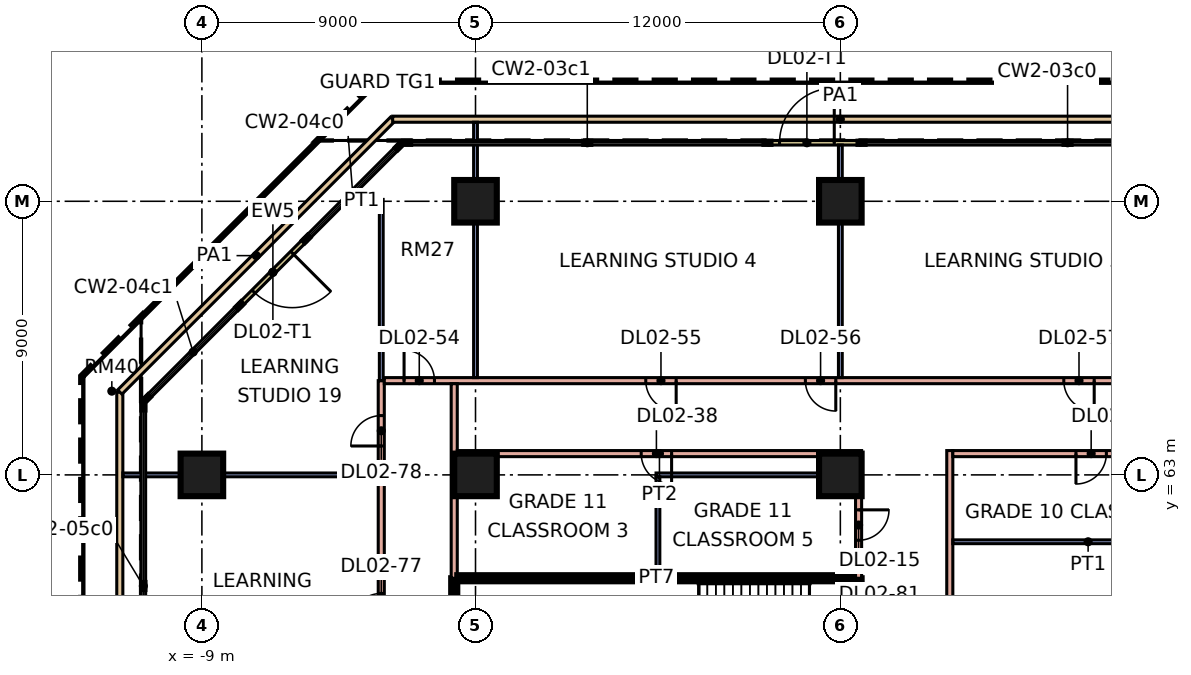
"""IFC4 building model, lengths in metres.
Left out: names, types, materials, properties, quantities, classifications, styles, units other than length and angle.
Written with IfcOpenShell. Run it as: python <this file> out.ifc"""

import sys

from ifc_helpers import new_model, si_unit, direction, frame, frame_2d, origin, origin_2d, place, context, subcontext, project, spatial, rectangle, extrude, element, fill, save


model = new_model("IFC4")
c1 = context("Model", 3, precision=1e-05, world=origin(), true_north=direction((0.0, 1.0)))
c2 = subcontext(c1, "Body", "Model", "MODEL_VIEW")
j1 = project(units=[si_unit("LENGTHUNIT", "METRE"), si_unit("PLANEANGLEUNIT", "RADIAN")], contexts=[c1])
p1 = place(None, origin())
s1 = spatial("IfcSite", under=j1, at=p1, CompositionType="ELEMENT")
p2 = place(p1, origin())
s2 = spatial("IfcBuilding", under=s1, at=p2, CompositionType="ELEMENT")
p3 = place(p2, frame((0.0, 0.0, 12.0)))
s3 = spatial("IfcBuildingStorey", under=s2, at=p3, CompositionType="ELEMENT", Elevation=12.0)
for number, where, z_axis, x_axis in (
    (1, (-9.0, 63.0, 0.0), (0.0, 0.0, 1.0), (1.0, 0.0, 0.0)),
    (2, (0.0, 63.0, 0.0), (0.0, 0.0, 1.0), (1.0, 0.0, 0.0)),
    (3, (12.0, 63.0, 0.0), (0.0, 0.0, 1.0), (1.0, 0.0, 0.0)),
    (4, (0.0, 72.0, 0.0), (0.0, 0.0, 1.0), (1.0, 0.0, 0.0)),
    (5, (12.0, 72.0, 0.0), (0.0, 0.0, 1.0), (1.0, 0.0, 0.0)),
):
    element("IfcColumn", number, at=place(p3, frame(where, z_axis=z_axis, x_axis=x_axis)), inside=s3, PredefinedType="COLUMN", context=c2, shape_type="SweptSolid", body=[
        extrude(rectangle(XDim=1.4, YDim=1.4, at=origin_2d()), origin(), (0.0, 0.0, 1.0), 4.8),
    ])
p4 = place(p3, frame((12.65, 73.925, 0.0), z_axis=(0.0, 0.0, 1.0), x_axis=(-1.0, 0.0, 0.0)))
e6 = element("IfcWall", 6, at=p4, inside=s3, PredefinedType="SOLIDWALL", context=c2, shape_type="SweptSolid", body=[
    extrude(rectangle(XDim=3.0, YDim=0.15, at=frame_2d((1.5, 0.0))), origin(), (0.0, 0.0, 1.0), 4.4),
])
p5 = place(p4, frame((0.85, 0.0, 0.0)))
e7 = element("IfcOpeningElement", 7, at=p5, cuts=e6, PredefinedType="OPENING", context=c2, shape_type="SweptSolid", body=[
    extrude(rectangle(XDim=1.8, YDim=2.4, at=frame_2d((0.9, 1.2))), frame((0.0, 0.085, 0.0), z_axis=(0.0, -1.0, 0.0), x_axis=(1.0, 0.0, 0.0)), (0.0, 0.0, 1.0), 0.17),
])
p6 = place(p3, frame((-5.604, 70.725, 0.0), z_axis=(0.0, 0.0, 1.0), x_axis=(-0.707106781187, -0.707106781187, 0.0)))
e8 = element("IfcWall", 8, at=p6, inside=s3, PredefinedType="SOLIDWALL", context=c2, shape_type="SweptSolid", body=[
    extrude(rectangle(XDim=3.0, YDim=0.15, at=frame_2d((1.5, 0.0))), origin(), (0.0, 0.0, 1.0), 4.4),
])
p7 = place(p6, frame((0.6, 0.0, 0.0)))
e9 = element("IfcOpeningElement", 9, at=p7, cuts=e8, PredefinedType="OPENING", context=c2, shape_type="SweptSolid", body=[
    extrude(rectangle(XDim=1.8, YDim=2.4, at=frame_2d((0.9, 1.2))), frame((0.0, 0.085, 0.0), z_axis=(0.0, -1.0, 0.0), x_axis=(1.0, 0.0, 0.0)), (0.0, 0.0, 1.0), 0.17),
])
p8 = place(p3, frame((-11.7, 8.275, 0.0), z_axis=(0.0, 0.0, 1.0), x_axis=(0.0, 1.0, 0.0)))
e10 = element("IfcWall", 10, at=p8, inside=s3, PredefinedType="PARAPET", context=c2, shape_type="SweptSolid", body=[
    extrude(rectangle(XDim=57.45, YDim=0.2, at=frame_2d((28.725, 0.0))), origin(), (0.0, 0.0, 1.0), 0.5),
])
p9 = place(p3, frame((-11.7, 65.725, 0.0), z_axis=(0.0, 0.0, 1.0), x_axis=(0.707106781187, 0.707106781187, 0.0)))
e11 = element("IfcWall", 11, at=p9, inside=s3, PredefinedType="PARAPET", context=c2, shape_type="SweptSolid", body=[
    extrude(rectangle(XDim=12.692, YDim=0.2, at=frame_2d((6.346, 0.0))), origin(), (0.0, 0.0, 1.0), 0.5),
])
p10 = place(p3, frame((-2.725, 74.7, 0.0), z_axis=(0.0, 0.0, 1.0), x_axis=(1.0, 0.0, 0.0)))
e12 = element("IfcWall", 12, at=p10, inside=s3, PredefinedType="PARAPET", context=c2, shape_type="SweptSolid", body=[
    extrude(rectangle(XDim=29.45, YDim=0.2, at=frame_2d((14.725, 0.0))), origin(), (0.0, 0.0, 1.0), 0.5),
])
p11 = place(p3, frame((-11.6, 63.0, 0.0), z_axis=(0.0, 0.0, 1.0), x_axis=(1.0, 0.0, 0.0)))
e13 = element("IfcWall", 13, at=p11, inside=s3, PredefinedType="PARTITIONING", context=c2, shape_type="SweptSolid", body=[
    extrude(rectangle(XDim=8.4, YDim=0.125, at=frame_2d((4.2, 0.0))), origin(), (0.0, 0.0, 1.0), 4.4),
])
p12 = place(p3, frame((-4.329, 72.0, 0.0), z_axis=(0.0, 0.0, 1.0), x_axis=(1.0, 0.0, 0.0)))
e14 = element("IfcWall", 14, at=p12, inside=s3, PredefinedType="PARTITIONING", context=c2, shape_type="SweptSolid", body=[
    extrude(rectangle(XDim=1.167, YDim=0.125, at=frame_2d((0.583, 0.0))), origin(), (0.0, 0.0, 1.0), 4.4),
])
p13 = place(p3, frame((-3.1, -0.184, 0.0), z_axis=(0.0, 0.0, 1.0), x_axis=(0.0, 1.0, 0.0)))
e15 = element("IfcWall", 15, at=p13, inside=s3, PredefinedType="PARTITIONING", context=c2, shape_type="SweptSolid", body=[
    extrude(rectangle(XDim=66.284, YDim=0.2, at=frame_2d((33.142, 0.0))), origin(), (0.0, 0.0, 1.0), 4.4),
])
p14 = place(p13, frame((6.034, 0.0, 0.0)))
e16 = element("IfcOpeningElement", 16, at=p14, cuts=e15, PredefinedType="OPENING", context=c2, shape_type="SweptSolid", body=[
    extrude(rectangle(XDim=1.0, YDim=2.1, at=frame_2d((0.5, 1.05))), frame((0.0, 0.11, 0.0), z_axis=(0.0, -1.0, 0.0), x_axis=(1.0, 0.0, 0.0)), (0.0, 0.0, 1.0), 0.22),
])
p15 = place(p13, frame((17.784, 0.0, 0.0)))
e17 = element("IfcOpeningElement", 17, at=p15, cuts=e15, PredefinedType="OPENING", context=c2, shape_type="SweptSolid", body=[
    extrude(rectangle(XDim=1.0, YDim=2.1, at=frame_2d((0.5, 1.05))), frame((0.0, 0.11, 0.0), z_axis=(0.0, -1.0, 0.0), x_axis=(1.0, 0.0, 0.0)), (0.0, 0.0, 1.0), 0.22),
])
p16 = place(p13, frame((23.034, 0.0, 0.0)))
e18 = element("IfcOpeningElement", 18, at=p16, cuts=e15, PredefinedType="OPENING", context=c2, shape_type="SweptSolid", body=[
    extrude(rectangle(XDim=1.0, YDim=2.1, at=frame_2d((0.5, 1.05))), frame((0.0, 0.11, 0.0), z_axis=(0.0, -1.0, 0.0), x_axis=(1.0, 0.0, 0.0)), (0.0, 0.0, 1.0), 0.22),
])
p17 = place(p13, frame((29.784, 0.0, 0.0)))
e19 = element("IfcOpeningElement", 19, at=p17, cuts=e15, PredefinedType="OPENING", context=c2, shape_type="SweptSolid", body=[
    extrude(rectangle(XDim=1.0, YDim=2.1, at=frame_2d((0.5, 1.05))), frame((0.0, 0.11, 0.0), z_axis=(0.0, -1.0, 0.0), x_axis=(1.0, 0.0, 0.0)), (0.0, 0.0, 1.0), 0.22),
])
p18 = place(p13, frame((35.034, 0.0, 0.0)))
e20 = element("IfcOpeningElement", 20, at=p18, cuts=e15, PredefinedType="OPENING", context=c2, shape_type="SweptSolid", body=[
    extrude(rectangle(XDim=1.0, YDim=2.1, at=frame_2d((0.5, 1.05))), frame((0.0, 0.11, 0.0), z_axis=(0.0, -1.0, 0.0), x_axis=(1.0, 0.0, 0.0)), (0.0, 0.0, 1.0), 0.22),
])
p19 = place(p13, frame((40.284, 0.0, 0.0)))
e21 = element("IfcOpeningElement", 21, at=p19, cuts=e15, PredefinedType="OPENING", context=c2, shape_type="SweptSolid", body=[
    extrude(rectangle(XDim=1.0, YDim=2.1, at=frame_2d((0.5, 1.05))), frame((0.0, 0.11, 0.0), z_axis=(0.0, -1.0, 0.0), x_axis=(1.0, 0.0, 0.0)), (0.0, 0.0, 1.0), 0.22),
])
p20 = place(p13, frame((49.284, 0.0, 0.0)))
e22 = element("IfcOpeningElement", 22, at=p20, cuts=e15, PredefinedType="OPENING", context=c2, shape_type="SweptSolid", body=[
    extrude(rectangle(XDim=1.0, YDim=2.1, at=frame_2d((0.5, 1.05))), frame((0.0, 0.11, 0.0), z_axis=(0.0, -1.0, 0.0), x_axis=(1.0, 0.0, 0.0)), (0.0, 0.0, 1.0), 0.22),
])
p21 = place(p13, frame((58.284, 0.0, 0.0)))
e23 = element("IfcOpeningElement", 23, at=p21, cuts=e15, PredefinedType="OPENING", context=c2, shape_type="SweptSolid", body=[
    extrude(rectangle(XDim=1.0, YDim=2.1, at=frame_2d((0.5, 1.05))), frame((0.0, 0.11, 0.0), z_axis=(0.0, -1.0, 0.0), x_axis=(1.0, 0.0, 0.0)), (0.0, 0.0, 1.0), 0.22),
])
p22 = place(p13, frame((64.134, 0.0, 0.0)))
e24 = element("IfcOpeningElement", 24, at=p22, cuts=e15, PredefinedType="OPENING", context=c2, shape_type="SweptSolid", body=[
    extrude(rectangle(XDim=1.0, YDim=2.1, at=frame_2d((0.5, 1.05))), frame((0.0, 0.11, 0.0), z_axis=(0.0, -1.0, 0.0), x_axis=(1.0, 0.0, 0.0)), (0.0, 0.0, 1.0), 0.22),
])
p23 = place(p3, frame((-3.1, 66.1, 0.0), z_axis=(0.0, 0.0, 1.0), x_axis=(0.0, 1.0, 0.0)))
e25 = element("IfcWall", 25, at=p23, inside=s3, PredefinedType="PARTITIONING", context=c2, shape_type="SweptSolid", body=[
    extrude(rectangle(XDim=5.962, YDim=0.125, at=frame_2d((2.981, 0.0))), origin(), (0.0, 0.0, 1.0), 4.4),
])
p24 = place(p3, frame((-3.0, 66.1, 0.0), z_axis=(0.0, 0.0, 1.0), x_axis=(1.0, 0.0, 0.0)))
e26 = element("IfcWall", 26, at=p24, inside=s3, PredefinedType="PARTITIONING", context=c2, shape_type="SweptSolid", body=[
    extrude(rectangle(XDim=30.0, YDim=0.2, at=frame_2d((15.0, 0.0))), origin(), (0.0, 0.0, 1.0), 4.4),
])
p25 = place(p24, frame((0.65, 0.0, 0.0)))
e27 = element("IfcOpeningElement", 27, at=p25, cuts=e26, PredefinedType="OPENING", context=c2, shape_type="SweptSolid", body=[
    extrude(rectangle(XDim=1.0, YDim=2.1, at=frame_2d((0.5, 1.05))), frame((0.0, 0.11, 0.0), z_axis=(0.0, -1.0, 0.0), x_axis=(1.0, 0.0, 0.0)), (0.0, 0.0, 1.0), 0.22),
])
p26 = place(p24, frame((8.6, 0.0, 0.0)))
e28 = element("IfcOpeningElement", 28, at=p26, cuts=e26, PredefinedType="OPENING", context=c2, shape_type="SweptSolid", body=[
    extrude(rectangle(XDim=1.0, YDim=2.1, at=frame_2d((0.5, 1.05))), frame((0.0, 0.11, 0.0), z_axis=(0.0, -1.0, 0.0), x_axis=(1.0, 0.0, 0.0)), (0.0, 0.0, 1.0), 0.22),
])
p27 = place(p24, frame((13.85, 0.0, 0.0)))
e29 = element("IfcOpeningElement", 29, at=p27, cuts=e26, PredefinedType="OPENING", context=c2, shape_type="SweptSolid", body=[
    extrude(rectangle(XDim=1.0, YDim=2.1, at=frame_2d((0.5, 1.05))), frame((0.0, 0.11, 0.0), z_axis=(0.0, -1.0, 0.0), x_axis=(1.0, 0.0, 0.0)), (0.0, 0.0, 1.0), 0.22),
])
p28 = place(p24, frame((22.35, 0.0, 0.0)))
e30 = element("IfcOpeningElement", 30, at=p28, cuts=e26, PredefinedType="OPENING", context=c2, shape_type="SweptSolid", body=[
    extrude(rectangle(XDim=1.0, YDim=2.1, at=frame_2d((0.5, 1.05))), frame((0.0, 0.11, 0.0), z_axis=(0.0, -1.0, 0.0), x_axis=(1.0, 0.0, 0.0)), (0.0, 0.0, 1.0), 0.22),
])
p29 = place(p24, frame((25.85, 0.0, 0.0)))
e31 = element("IfcOpeningElement", 31, at=p29, cuts=e26, PredefinedType="OPENING", context=c2, shape_type="SweptSolid", body=[
    extrude(rectangle(XDim=1.0, YDim=2.1, at=frame_2d((0.5, 1.05))), frame((0.0, 0.11, 0.0), z_axis=(0.0, -1.0, 0.0), x_axis=(1.0, 0.0, 0.0)), (0.0, 0.0, 1.0), 0.22),
])
p30 = place(p24, frame((28.45, 0.0, 0.0)))
e32 = element("IfcOpeningElement", 32, at=p30, cuts=e26, PredefinedType="OPENING", context=c2, shape_type="SweptSolid", body=[
    extrude(rectangle(XDim=1.0, YDim=2.1, at=frame_2d((0.5, 1.05))), frame((0.0, 0.11, 0.0), z_axis=(0.0, -1.0, 0.0), x_axis=(1.0, 0.0, 0.0)), (0.0, 0.0, 1.0), 0.22),
])
p31 = place(p3, frame((-0.7, 54.0, 0.0), z_axis=(0.0, 0.0, 1.0), x_axis=(0.0, 1.0, 0.0)))
e33 = element("IfcWall", 33, at=p31, inside=s3, PredefinedType="SOLIDWALL", context=c2, shape_type="SweptSolid", body=[
    extrude(rectangle(XDim=5.6, YDim=0.2, at=frame_2d((2.8, 0.0))), origin(), (0.0, 0.0, 1.0), 4.4),
])
p32 = place(p3, frame((-0.7, 59.6, 0.0), z_axis=(0.0, 0.0, 1.0), x_axis=(0.0, 1.0, 0.0)))
e34 = element("IfcWall", 34, at=p32, inside=s3, PredefinedType="PARTITIONING", context=c2, shape_type="SweptSolid", body=[
    extrude(rectangle(XDim=6.4, YDim=0.2, at=frame_2d((3.2, 0.0))), origin(), (0.0, 0.0, 1.0), 4.4),
])
p33 = place(p3, frame((-0.6, 59.6, 0.0), z_axis=(0.0, 0.0, 1.0), x_axis=(1.0, 0.0, 0.0)))
e35 = element("IfcWall", 35, at=p33, inside=s3, PredefinedType="SOLIDWALL", context=c2, shape_type="SweptSolid", body=[
    extrude(rectangle(XDim=13.1, YDim=0.2, at=frame_2d((6.55, 0.0))), origin(), (0.0, 0.0, 1.0), 4.4),
])
p34 = place(p3, frame((-0.6, 63.7, 0.0), z_axis=(0.0, 0.0, 1.0), x_axis=(1.0, 0.0, 0.0)))
e36 = element("IfcWall", 36, at=p34, inside=s3, PredefinedType="PARTITIONING", context=c2, shape_type="SweptSolid", body=[
    extrude(rectangle(XDim=13.3, YDim=0.2, at=frame_2d((6.65, 0.0))), origin(), (0.0, 0.0, 1.0), 4.4),
])
p35 = place(p34, frame((6.05, 0.0, 0.0)))
e37 = element("IfcOpeningElement", 37, at=p35, cuts=e36, PredefinedType="OPENING", context=c2, shape_type="SweptSolid", body=[
    extrude(rectangle(XDim=1.0, YDim=2.1, at=frame_2d((0.5, 1.05))), frame((0.0, 0.11, 0.0), z_axis=(0.0, -1.0, 0.0), x_axis=(1.0, 0.0, 0.0)), (0.0, 0.0, 1.0), 0.22),
])
p36 = place(p3, frame((0.0, 66.2, 0.0), z_axis=(0.0, 0.0, 1.0), x_axis=(0.0, 1.0, 0.0)))
e38 = element("IfcWall", 38, at=p36, inside=s3, PredefinedType="PARTITIONING", context=c2, shape_type="SweptSolid", body=[
    extrude(rectangle(XDim=8.4, YDim=0.125, at=frame_2d((4.2, 0.0))), origin(), (0.0, 0.0, 1.0), 4.4),
])
p37 = place(p3, frame((5.938, 63.0, 0.0), z_axis=(0.0, 0.0, 1.0), x_axis=(1.0, 0.0, 0.0)))
e39 = element("IfcWall", 39, at=p37, inside=s3, PredefinedType="PARTITIONING", context=c2, shape_type="SweptSolid", body=[
    extrude(rectangle(XDim=6.562, YDim=0.125, at=frame_2d((3.281, 0.0))), origin(), (0.0, 0.0, 1.0), 4.4),
])
p38 = place(p3, frame((6.0, 59.7, 0.0), z_axis=(0.0, 0.0, 1.0), x_axis=(0.0, 1.0, 0.0)))
e40 = element("IfcWall", 40, at=p38, inside=s3, PredefinedType="PARTITIONING", context=c2, shape_type="SweptSolid", body=[
    extrude(rectangle(XDim=3.238, YDim=0.125, at=frame_2d((1.619, 0.0))), origin(), (0.0, 0.0, 1.0), 4.4),
])
p39 = place(p3, frame((12.0, 66.2, 0.0), z_axis=(0.0, 0.0, 1.0), x_axis=(0.0, 1.0, 0.0)))
e41 = element("IfcWall", 41, at=p39, inside=s3, PredefinedType="PARTITIONING", context=c2, shape_type="SweptSolid", body=[
    extrude(rectangle(XDim=7.651, YDim=0.125, at=frame_2d((3.826, 0.0))), origin(), (0.0, 0.0, 1.0), 4.4),
])
p40 = place(p3, frame((12.6, 54.0, 0.0), z_axis=(0.0, 0.0, 1.0), x_axis=(0.0, 1.0, 0.0)))
e42 = element("IfcWall", 42, at=p40, inside=s3, PredefinedType="SOLIDWALL", context=c2, shape_type="SweptSolid", body=[
    extrude(rectangle(XDim=5.6, YDim=0.2, at=frame_2d((2.8, 0.0))), origin(), (0.0, 0.0, 1.0), 4.4),
])
p41 = place(p40, frame((3.25, 0.0, 0.0)))
e43 = element("IfcOpeningElement", 43, at=p41, cuts=e42, PredefinedType="OPENING", context=c2, shape_type="SweptSolid", body=[
    extrude(rectangle(XDim=1.2, YDim=2.1, at=frame_2d((0.6, 1.05))), frame((0.0, 0.11, 0.0), z_axis=(0.0, -1.0, 0.0), x_axis=(1.0, 0.0, 0.0)), (0.0, 0.0, 1.0), 0.22),
])
p42 = place(p3, frame((12.6, 59.6, 0.0), z_axis=(0.0, 0.0, 1.0), x_axis=(0.0, 1.0, 0.0)))
e44 = element("IfcWall", 44, at=p42, inside=s3, PredefinedType="PARTITIONING", context=c2, shape_type="SweptSolid", body=[
    extrude(rectangle(XDim=4.0, YDim=0.2, at=frame_2d((2.0, 0.0))), origin(), (0.0, 0.0, 1.0), 4.4),
])
p43 = place(p42, frame((1.25, 0.0, 0.0)))
e45 = element("IfcOpeningElement", 45, at=p43, cuts=e44, PredefinedType="OPENING", context=c2, shape_type="SweptSolid", body=[
    extrude(rectangle(XDim=1.0, YDim=2.1, at=frame_2d((0.5, 1.05))), frame((0.0, 0.11, 0.0), z_axis=(0.0, -1.0, 0.0), x_axis=(1.0, 0.0, 0.0)), (0.0, 0.0, 1.0), 0.22),
])
p44 = place(p3, frame((15.6, 51.225, 0.0), z_axis=(0.0, 0.0, 1.0), x_axis=(0.0, 1.0, 0.0)))
e46 = element("IfcWall", 46, at=p44, inside=s3, PredefinedType="PARTITIONING", context=c2, shape_type="SweptSolid", body=[
    extrude(rectangle(XDim=12.575, YDim=0.2, at=frame_2d((6.288, 0.0))), origin(), (0.0, 0.0, 1.0), 4.4),
])
p45 = place(p44, frame((6.025, 0.0, 0.0)))
e47 = element("IfcOpeningElement", 47, at=p45, cuts=e46, PredefinedType="OPENING", context=c2, shape_type="SweptSolid", body=[
    extrude(rectangle(XDim=1.0, YDim=2.1, at=frame_2d((0.5, 1.05))), frame((0.0, 0.11, 0.0), z_axis=(0.0, -1.0, 0.0), x_axis=(1.0, 0.0, 0.0)), (0.0, 0.0, 1.0), 0.22),
])
p46 = place(p3, frame((15.7, 60.8, 0.0), z_axis=(0.0, 0.0, 1.0), x_axis=(1.0, 0.0, 0.0)))
e48 = element("IfcWall", 48, at=p46, inside=s3, PredefinedType="PARTITIONING", context=c2, shape_type="SweptSolid", body=[
    extrude(rectangle(XDim=8.9, YDim=0.125, at=frame_2d((4.45, 0.0))), origin(), (0.0, 0.0, 1.0), 4.4),
])
p47 = place(p3, frame((15.7, 63.7, 0.0), z_axis=(0.0, 0.0, 1.0), x_axis=(1.0, 0.0, 0.0)))
e49 = element("IfcWall", 49, at=p47, inside=s3, PredefinedType="PARTITIONING", context=c2, shape_type="SweptSolid", body=[
    extrude(rectangle(XDim=8.9, YDim=0.2, at=frame_2d((4.45, 0.0))), origin(), (0.0, 0.0, 1.0), 4.4),
])
p48 = place(p47, frame((4.05, 0.0, 0.0)))
e50 = element("IfcOpeningElement", 50, at=p48, cuts=e49, PredefinedType="OPENING", context=c2, shape_type="SweptSolid", body=[
    extrude(rectangle(XDim=1.0, YDim=2.1, at=frame_2d((0.5, 1.05))), frame((0.0, 0.11, 0.0), z_axis=(0.0, -1.0, 0.0), x_axis=(1.0, 0.0, 0.0)), (0.0, 0.0, 1.0), 0.22),
])
p49 = place(p5, frame((1.8, 0.0, 0.0), z_axis=(0.0, 0.0, 1.0), x_axis=(-1.0, 0.0, 0.0)))
e51 = element("IfcDoor", 51, at=p49, inside=s3, OperationType="DOUBLE_DOOR_SINGLE_SWING", PredefinedType="DOOR", context=c2, shape_type="SweptSolid", body=[
    extrude(rectangle(XDim=1.8, YDim=2.4, at=frame_2d((0.9, 1.2))), frame((0.0, 0.025, 0.0), z_axis=(0.0, -1.0, 0.0), x_axis=(1.0, 0.0, 0.0)), (0.0, 0.0, 1.0), 0.05),
])
fill(e7, e51)
p50 = place(p7, origin())
e52 = element("IfcDoor", 52, at=p50, inside=s3, OperationType="DOUBLE_DOOR_SINGLE_SWING", PredefinedType="DOOR", context=c2, shape_type="SweptSolid", body=[
    extrude(rectangle(XDim=1.8, YDim=2.4, at=frame_2d((0.9, 1.2))), frame((0.0, 0.025, 0.0), z_axis=(0.0, -1.0, 0.0), x_axis=(1.0, 0.0, 0.0)), (0.0, 0.0, 1.0), 0.05),
])
fill(e9, e52)
p51 = place(p43, origin())
e53 = element("IfcDoor", 53, at=p51, inside=s3, OperationType="SINGLE_SWING_RIGHT", PredefinedType="DOOR", context=c2, shape_type="SweptSolid", body=[
    extrude(rectangle(XDim=1.0, YDim=2.1, at=frame_2d((0.5, 1.05))), frame((0.0, 0.025, 0.0), z_axis=(0.0, -1.0, 0.0), x_axis=(1.0, 0.0, 0.0)), (0.0, 0.0, 1.0), 0.05),
])
fill(e45, e53)
p52 = place(p48, frame((1.0, 0.0, 0.0), z_axis=(0.0, 0.0, 1.0), x_axis=(-1.0, 0.0, 0.0)))
e54 = element("IfcDoor", 54, at=p52, inside=s3, OperationType="SINGLE_SWING_LEFT", PredefinedType="DOOR", context=c2, shape_type="SweptSolid", body=[
    extrude(rectangle(XDim=1.0, YDim=2.1, at=frame_2d((0.5, 1.05))), frame((0.0, 0.025, 0.0), z_axis=(0.0, -1.0, 0.0), x_axis=(1.0, 0.0, 0.0)), (0.0, 0.0, 1.0), 0.05),
])
fill(e50, e54)
p53 = place(p35, origin())
e55 = element("IfcDoor", 55, at=p53, inside=s3, OperationType="SINGLE_SWING_RIGHT", PredefinedType="DOOR", context=c2, shape_type="SweptSolid", body=[
    extrude(rectangle(XDim=1.0, YDim=2.1, at=frame_2d((0.5, 1.05))), frame((0.0, 0.025, 0.0), z_axis=(0.0, -1.0, 0.0), x_axis=(1.0, 0.0, 0.0)), (0.0, 0.0, 1.0), 0.05),
])
fill(e37, e55)
p54 = place(p25, origin())
e56 = element("IfcDoor", 56, at=p54, inside=s3, OperationType="SINGLE_SWING_LEFT", PredefinedType="DOOR", context=c2, shape_type="SweptSolid", body=[
    extrude(rectangle(XDim=1.0, YDim=2.1, at=frame_2d((0.5, 1.05))), frame((0.0, 0.025, 0.0), z_axis=(0.0, -1.0, 0.0), x_axis=(1.0, 0.0, 0.0)), (0.0, 0.0, 1.0), 0.05),
])
fill(e27, e56)
p55 = place(p26, origin())
e57 = element("IfcDoor", 57, at=p55, inside=s3, OperationType="SINGLE_SWING_RIGHT", PredefinedType="DOOR", context=c2, shape_type="SweptSolid", body=[
    extrude(rectangle(XDim=1.0, YDim=2.1, at=frame_2d((0.5, 1.05))), frame((0.0, 0.025, 0.0), z_axis=(0.0, -1.0, 0.0), x_axis=(1.0, 0.0, 0.0)), (0.0, 0.0, 1.0), 0.05),
])
fill(e28, e57)
p56 = place(p27, origin())
e58 = element("IfcDoor", 58, at=p56, inside=s3, OperationType="SINGLE_SWING_RIGHT", PredefinedType="DOOR", context=c2, shape_type="SweptSolid", body=[
    extrude(rectangle(XDim=1.0, YDim=2.1, at=frame_2d((0.5, 1.05))), frame((0.0, 0.025, 0.0), z_axis=(0.0, -1.0, 0.0), x_axis=(1.0, 0.0, 0.0)), (0.0, 0.0, 1.0), 0.05),
])
fill(e29, e58)
p57 = place(p28, origin())
e59 = element("IfcDoor", 59, at=p57, inside=s3, OperationType="SINGLE_SWING_RIGHT", PredefinedType="DOOR", context=c2, shape_type="SweptSolid", body=[
    extrude(rectangle(XDim=1.0, YDim=2.1, at=frame_2d((0.5, 1.05))), frame((0.0, 0.025, 0.0), z_axis=(0.0, -1.0, 0.0), x_axis=(1.0, 0.0, 0.0)), (0.0, 0.0, 1.0), 0.05),
])
fill(e30, e59)
p58 = place(p21, origin())
e60 = element("IfcDoor", 60, at=p58, inside=s3, OperationType="SINGLE_SWING_LEFT", PredefinedType="DOOR", context=c2, shape_type="SweptSolid", body=[
    extrude(rectangle(XDim=1.0, YDim=2.1, at=frame_2d((0.5, 1.05))), frame((0.0, 0.025, 0.0), z_axis=(0.0, -1.0, 0.0), x_axis=(1.0, 0.0, 0.0)), (0.0, 0.0, 1.0), 0.05),
])
fill(e23, e60)
p59 = place(p22, origin())
e61 = element("IfcDoor", 61, at=p59, inside=s3, OperationType="SINGLE_SWING_LEFT", PredefinedType="DOOR", context=c2, shape_type="SweptSolid", body=[
    extrude(rectangle(XDim=1.0, YDim=2.1, at=frame_2d((0.5, 1.05))), frame((0.0, 0.025, 0.0), z_axis=(0.0, -1.0, 0.0), x_axis=(1.0, 0.0, 0.0)), (0.0, 0.0, 1.0), 0.05),
])
fill(e24, e61)
save(model, sys.argv[1])
